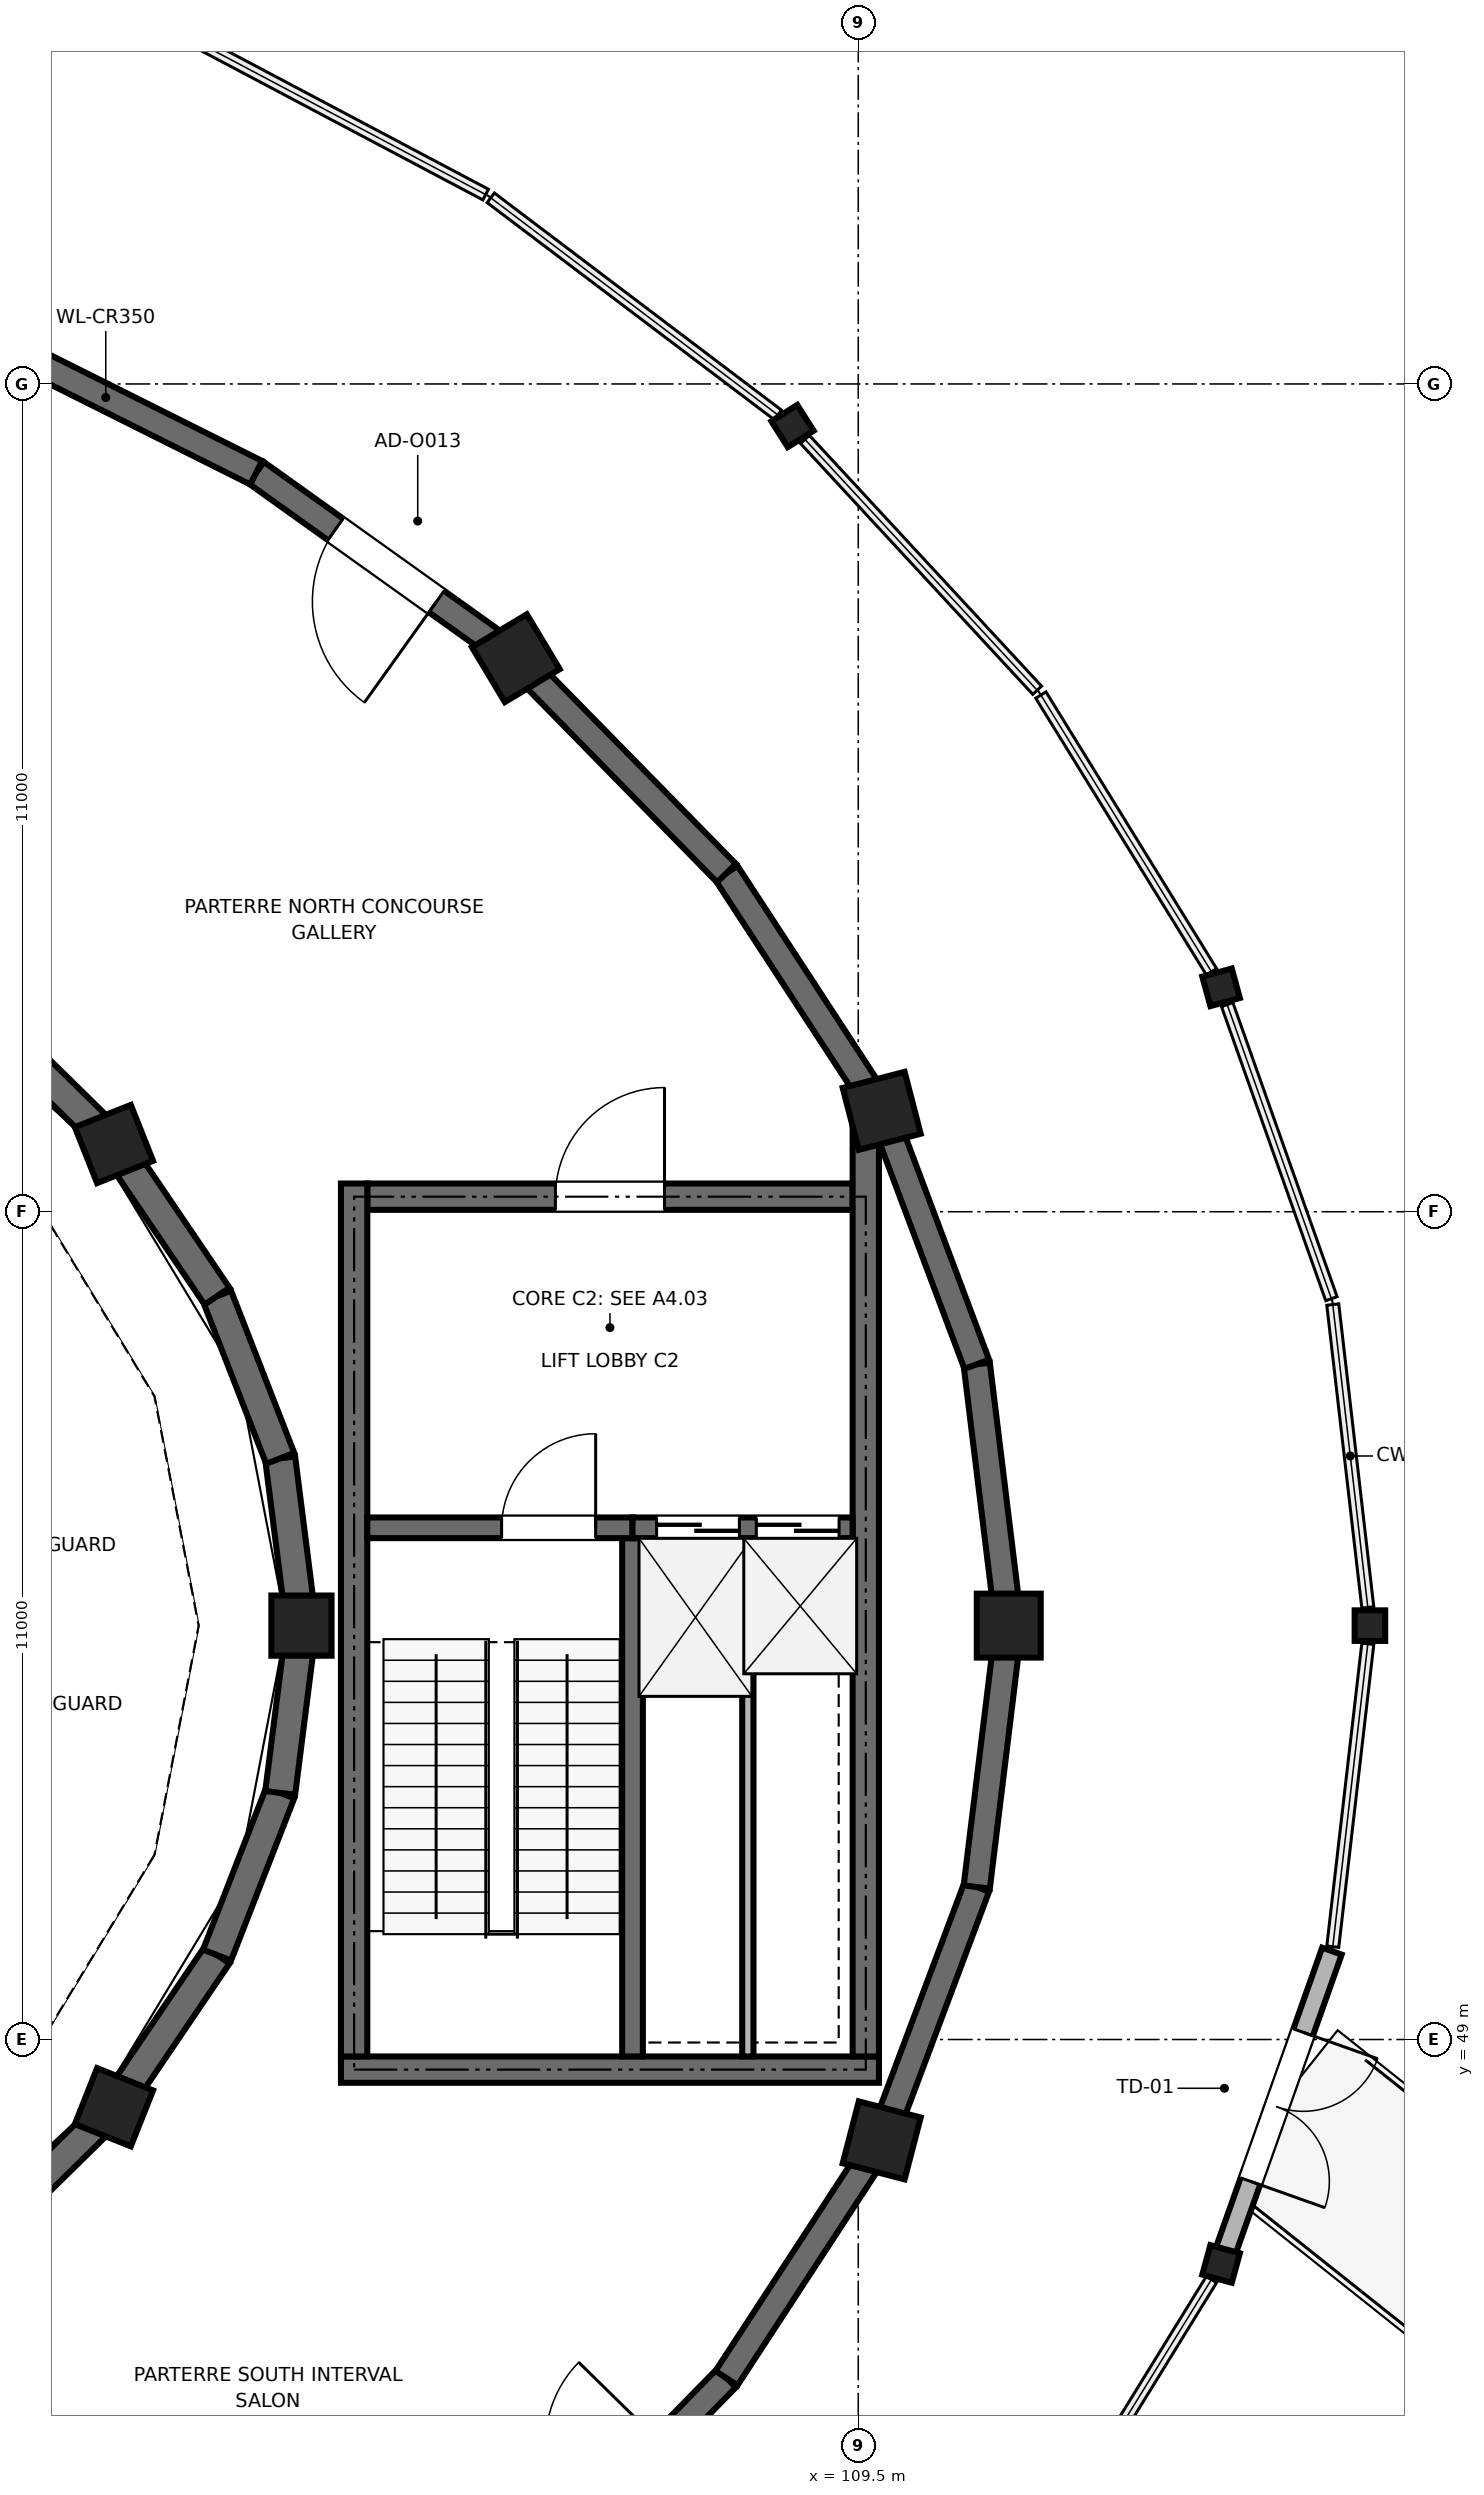
"""IFC4 building model, lengths in metres.
Left out: names, types, materials, properties, quantities, classifications, styles, units other than length and angle.
Written with IfcOpenShell. Run it as: python <this file> out.ifc"""

import sys

from ifc_helpers import new_model, si_unit, direction, frame, frame_2d, origin, origin_2d, place, context, subcontext, project, spatial, rectangle, circle, hollow_circle, extrude, element, fill, save


model = new_model("IFC4")
c1 = context("Model", 3, precision=1e-05, world=origin(), true_north=direction((0.0, 1.0)))
c2 = subcontext(c1, "Body", "Model", "MODEL_VIEW")
j1 = project(units=[si_unit("LENGTHUNIT", "METRE"), si_unit("PLANEANGLEUNIT", "RADIAN")], contexts=[c1])
p1 = place(None, origin())
s1 = spatial("IfcSite", under=j1, at=p1, CompositionType="ELEMENT")
p2 = place(p1, origin())
s2 = spatial("IfcBuilding", under=s1, at=p2, CompositionType="ELEMENT")
p3 = place(p2, frame((0.0, 0.0, 4.8)))
s3 = spatial("IfcBuildingStorey", under=s2, at=p3, CompositionType="ELEMENT", Elevation=4.8)
for number, where, z_axis, x_axis in (
    (1, (116.3, 54.5, 0.0), (0.0, 0.0, 1.0), (1.0, 0.0, 0.0)),
    (2, (114.322, 62.982, 0.0), (0.0, 0.0, 1.0), (0.964, 0.265, 0.0)),
    (3, (108.626, 70.441, 0.0), (0.0, 0.0, 1.0), (0.844, 0.536, 0.0)),
    (4, (114.322, 46.018, 0.0), (0.0, 0.0, 1.0), (0.964, -0.265, 0.0)),
):
    element("IfcColumn", number, at=place(p3, frame(where, z_axis=z_axis, x_axis=x_axis)), inside=s3, PredefinedType="COLUMN", context=c2, shape_type="SweptSolid", body=[
        extrude(hollow_circle(Radius=0.203, WallThickness=0.025, at=origin_2d()), origin(), (0.0, 0.0, 1.0), 4.8),
    ])
for number, where, z_axis, x_axis in (
    (5, (111.5, 54.5, 0.0), (0.0, 0.0, 1.0), (1.0, 0.0, 0.0)),
    (6, (109.811, 61.34, 0.0), (0.0, 0.0, 1.0), (0.968, 0.252, 0.0)),
    (7, (104.949, 67.356, 0.0), (0.0, 0.0, 1.0), (0.858, 0.514, 0.0)),
    (8, (109.811, 47.66, 0.0), (0.0, 0.0, 1.0), (0.968, -0.252, 0.0)),
):
    element("IfcColumn", number, at=place(p3, frame(where, z_axis=z_axis, x_axis=x_axis)), inside=s3, PredefinedType="COLUMN", context=c2, shape_type="SweptSolid", body=[
        extrude(rectangle(XDim=0.85, YDim=0.85, at=origin_2d()), origin(), (0.0, 0.0, 1.0), 4.8),
    ])
for number, where, z_axis, x_axis in (
    (9, (102.1, 54.5, 0.0), (0.0, 0.0, 1.0), (1.0, 0.0, 0.0)),
    (10, (99.608, 60.9, 0.0), (0.0, 0.0, 1.0), (0.929, 0.369, 0.0)),
    (11, (99.608, 48.1, 0.0), (0.0, 0.0, 1.0), (0.929, -0.369, 0.0)),
):
    element("IfcColumn", number, at=place(p3, frame(where, z_axis=z_axis, x_axis=x_axis)), inside=s3, PredefinedType="COLUMN", context=c2, shape_type="SweptSolid", body=[
        extrude(circle(Radius=0.4, at=origin_2d()), origin(), (0.0, 0.0, 1.0), 4.8),
    ])
p4 = place(p3, frame((111.5, 54.5, 0.0), z_axis=(0.0, 0.0, 1.0), x_axis=(-0.121552414401, 0.99258501427, 0.0)))
e12 = element("IfcWall", 12, at=p4, inside=s3, PredefinedType="SHEAR", context=c2, shape_type="SweptSolid", body=[
    extrude(rectangle(XDim=3.499, YDim=0.35, at=frame_2d((1.75, 0.0))), origin(), (0.0, 0.0, 1.0), 4.54),
])
p5 = place(p3, frame((111.075, 57.973, 0.0), z_axis=(0.0, 0.0, 1.0), x_axis=(-0.351279653979, 0.936270583058, 0.0)))
e13 = element("IfcWall", 13, at=p5, inside=s3, PredefinedType="SHEAR", context=c2, shape_type="SweptSolid", body=[
    extrude(rectangle(XDim=3.597, YDim=0.35, at=frame_2d((1.798, 0.0))), origin(), (0.0, 0.0, 1.0), 4.54),
])
p6 = place(p3, frame((109.811, 61.34, 0.0), z_axis=(0.0, 0.0, 1.0), x_axis=(-0.546611158382, 0.837386554425, 0.0)))
e14 = element("IfcWall", 14, at=p6, inside=s3, PredefinedType="SHEAR", context=c2, shape_type="SweptSolid", body=[
    extrude(rectangle(XDim=3.773, YDim=0.35, at=frame_2d((1.887, 0.0))), origin(), (0.0, 0.0, 1.0), 4.54),
])
p7 = place(p3, frame((107.749, 64.5, 0.0), z_axis=(0.0, 0.0, 1.0), x_axis=(-0.700051268358, 0.714092586203, 0.0)))
e15 = element("IfcWall", 15, at=p7, inside=s3, PredefinedType="SHEAR", context=c2, shape_type="SweptSolid", body=[
    extrude(rectangle(XDim=3.999, YDim=0.35, at=frame_2d((2.0, 0.0))), origin(), (0.0, 0.0, 1.0), 4.54),
])
p8 = place(p3, frame((104.949, 67.356, 0.0), z_axis=(0.0, 0.0, 1.0), x_axis=(-0.813737360708, 0.581232748378, 0.0)))
e16 = element("IfcWall", 16, at=p8, inside=s3, PredefinedType="SHEAR", context=c2, shape_type="SweptSolid", body=[
    extrude(rectangle(XDim=4.241, YDim=0.35, at=frame_2d((2.121, 0.0))), origin(), (0.0, 0.0, 1.0), 4.54),
])
p9 = place(p8, frame((1.295, 0.0, 0.0)))
e17 = element("IfcOpeningElement", 17, at=p9, cuts=e16, PredefinedType="OPENING", context=c2, shape_type="SweptSolid", body=[
    extrude(rectangle(XDim=1.65, YDim=2.2, at=frame_2d((0.825, 1.1))), frame((0.0, 0.185, 0.0), z_axis=(0.0, -1.0, 0.0), x_axis=(1.0, 0.0, 0.0)), (0.0, 0.0, 1.0), 0.37),
])
p10 = place(p3, frame((101.498, 69.821, 0.0), z_axis=(0.0, 0.0, 1.0), x_axis=(-0.894361644392, 0.447344664705, 0.0)))
e18 = element("IfcWall", 18, at=p10, inside=s3, PredefinedType="SHEAR", context=c2, shape_type="SweptSolid", body=[
    extrude(rectangle(XDim=4.47, YDim=0.35, at=frame_2d((2.235, 0.0))), origin(), (0.0, 0.0, 1.0), 4.54),
])
p11 = place(p3, frame((104.949, 41.644, 0.0), z_axis=(0.0, 0.0, 1.0), x_axis=(0.700051268358, 0.714092586203, 0.0)))
e19 = element("IfcWall", 19, at=p11, inside=s3, PredefinedType="SHEAR", context=c2, shape_type="SweptSolid", body=[
    extrude(rectangle(XDim=3.999, YDim=0.35, at=frame_2d((2.0, 0.0))), origin(), (0.0, 0.0, 1.0), 4.54),
])
p12 = place(p11, frame((1.225, 0.0, 0.0)))
e20 = element("IfcOpeningElement", 20, at=p12, cuts=e19, PredefinedType="OPENING", context=c2, shape_type="SweptSolid", body=[
    extrude(rectangle(XDim=1.55, YDim=2.18, at=frame_2d((0.775, 1.09))), frame((0.0, 0.185, 0.0), z_axis=(0.0, -1.0, 0.0), x_axis=(1.0, 0.0, 0.0)), (0.0, 0.0, 1.0), 0.37),
])
p13 = place(p3, frame((107.749, 44.5, 0.0), z_axis=(0.0, 0.0, 1.0), x_axis=(0.546611158382, 0.837386554425, 0.0)))
e21 = element("IfcWall", 21, at=p13, inside=s3, PredefinedType="SHEAR", context=c2, shape_type="SweptSolid", body=[
    extrude(rectangle(XDim=3.773, YDim=0.35, at=frame_2d((1.887, 0.0))), origin(), (0.0, 0.0, 1.0), 4.54),
])
p14 = place(p3, frame((109.811, 47.66, 0.0), z_axis=(0.0, 0.0, 1.0), x_axis=(0.351279653979, 0.936270583058, 0.0)))
e22 = element("IfcWall", 22, at=p14, inside=s3, PredefinedType="SHEAR", context=c2, shape_type="SweptSolid", body=[
    extrude(rectangle(XDim=3.597, YDim=0.35, at=frame_2d((1.798, 0.0))), origin(), (0.0, 0.0, 1.0), 4.54),
])
p15 = place(p3, frame((111.075, 51.027, 0.0), z_axis=(0.0, 0.0, 1.0), x_axis=(0.121552414401, 0.99258501427, 0.0)))
e23 = element("IfcWall", 23, at=p15, inside=s3, PredefinedType="SHEAR", context=c2, shape_type="SweptSolid", body=[
    extrude(rectangle(XDim=3.499, YDim=0.35, at=frame_2d((1.75, 0.0))), origin(), (0.0, 0.0, 1.0), 4.54),
])
p16 = place(p3, frame((102.1, 54.5, 0.0), z_axis=(0.0, 0.0, 1.0), x_axis=(-0.126180195213, 0.992007337844, 0.0)))
e24 = element("IfcWall", 24, at=p16, inside=s3, PredefinedType="SOLIDWALL", context=c2, shape_type="SweptSolid", body=[
    extrude(rectangle(XDim=2.24, YDim=0.4, at=frame_2d((1.12, 0.0))), origin(), (0.0, 0.0, 1.0), 4.54),
])
p17 = place(p3, frame((101.817, 56.723, 0.0), z_axis=(0.0, 0.0, 1.0), x_axis=(-0.362802811216, 0.931865934657, 0.0)))
e25 = element("IfcWall", 25, at=p17, inside=s3, PredefinedType="SOLIDWALL", context=c2, shape_type="SweptSolid", body=[
    extrude(rectangle(XDim=2.313, YDim=0.4, at=frame_2d((1.156, 0.0))), origin(), (0.0, 0.0, 1.0), 4.54),
])
p18 = place(p3, frame((100.978, 58.878, 0.0), z_axis=(0.0, 0.0, 1.0), x_axis=(-0.560958648975, 0.827843822312, 0.0)))
e26 = element("IfcWall", 26, at=p18, inside=s3, PredefinedType="SOLIDWALL", context=c2, shape_type="SweptSolid", body=[
    extrude(rectangle(XDim=2.442, YDim=0.4, at=frame_2d((1.221, 0.0))), origin(), (0.0, 0.0, 1.0), 4.54),
])
for number, where, z_axis, x_axis in (
    (27, (99.608, 60.9, 0.0), (0.0, 0.0, 1.0), (-0.713, 0.701, 0.0)),
    (28, (97.748, 46.272, 0.0), (0.0, 0.0, 1.0), (0.713, 0.701, 0.0)),
):
    element("IfcWall", number, at=place(p3, frame(where, z_axis=z_axis, x_axis=x_axis)), inside=s3, PredefinedType="SOLIDWALL", context=c2, shape_type="SweptSolid", body=[
        extrude(rectangle(XDim=2.608, YDim=0.4, at=frame_2d((1.304, 0.0))), origin(), (0.0, 0.0, 1.0), 4.54),
    ])
p19 = place(p3, frame((99.608, 48.1, 0.0), z_axis=(0.0, 0.0, 1.0), x_axis=(0.560958648975, 0.827843822312, 0.0)))
e29 = element("IfcWall", 29, at=p19, inside=s3, PredefinedType="SOLIDWALL", context=c2, shape_type="SweptSolid", body=[
    extrude(rectangle(XDim=2.442, YDim=0.4, at=frame_2d((1.221, 0.0))), origin(), (0.0, 0.0, 1.0), 4.54),
])
p20 = place(p3, frame((100.978, 50.122, 0.0), z_axis=(0.0, 0.0, 1.0), x_axis=(0.362802811216, 0.931865934657, 0.0)))
e30 = element("IfcWall", 30, at=p20, inside=s3, PredefinedType="SOLIDWALL", context=c2, shape_type="SweptSolid", body=[
    extrude(rectangle(XDim=2.313, YDim=0.4, at=frame_2d((1.156, 0.0))), origin(), (0.0, 0.0, 1.0), 4.54),
])
p21 = place(p3, frame((101.817, 52.277, 0.0), z_axis=(0.0, 0.0, 1.0), x_axis=(0.126180195213, 0.992007337844, 0.0)))
e31 = element("IfcWall", 31, at=p21, inside=s3, PredefinedType="SOLIDWALL", context=c2, shape_type="SweptSolid", body=[
    extrude(rectangle(XDim=2.24, YDim=0.4, at=frame_2d((1.12, 0.0))), origin(), (0.0, 0.0, 1.0), 4.54),
])
p22 = place(p3, frame((115.795, 50.175, 0.0), z_axis=(0.0, 0.0, 1.0), x_axis=(-0.334024212389, -0.9425644941, 0.0)))
e32 = element("IfcWall", 32, at=p22, inside=s3, PredefinedType="SOLIDWALL", context=c2, shape_type="SweptSolid", body=[
    extrude(rectangle(XDim=4.39, YDim=0.275, at=frame_2d((2.195, 0.0))), origin(), (0.0, 0.0, 1.0), 4.078),
])
p23 = place(p22, frame((1.145, 0.0, 0.0)))
e33 = element("IfcOpeningElement", 33, at=p23, cuts=e32, PredefinedType="OPENING", context=c2, shape_type="SweptSolid", body=[
    extrude(rectangle(XDim=2.1, YDim=2.3, at=frame_2d((1.05, 1.15))), frame((0.0, 0.147, 0.0), z_axis=(0.0, -1.0, 0.0), x_axis=(1.0, 0.0, 0.0)), (0.0, 0.0, 1.0), 0.295),
])
p24 = place(p3, frame((102.625, 48.6, 0.0), z_axis=(0.0, 0.0, 1.0), x_axis=(1.0, 0.0, 0.0)))
e34 = element("IfcWall", 34, at=p24, inside=s3, PredefinedType="SHEAR", context=c2, shape_type="SweptSolid", body=[
    extrude(rectangle(XDim=7.15, YDim=0.35, at=frame_2d((3.575, 0.0))), origin(), (0.0, 0.0, 1.0), 4.54),
])
p25 = place(p3, frame((102.975, 60.2, 0.0), z_axis=(0.0, 0.0, 1.0), x_axis=(1.0, 0.0, 0.0)))
e35 = element("IfcWall", 35, at=p25, inside=s3, PredefinedType="SHEAR", context=c2, shape_type="SweptSolid", body=[
    extrude(rectangle(XDim=6.45, YDim=0.35, at=frame_2d((3.225, 0.0))), origin(), (0.0, 0.0, 1.0), 4.54),
])
p26 = place(p25, frame((2.5, 0.0, 0.0)))
e36 = element("IfcOpeningElement", 36, at=p26, cuts=e35, PredefinedType="OPENING", context=c2, shape_type="SweptSolid", body=[
    extrude(rectangle(XDim=1.45, YDim=2.2, at=frame_2d((0.725, 1.1))), frame((0.0, 0.185, 0.0), z_axis=(0.0, -1.0, 0.0), x_axis=(1.0, 0.0, 0.0)), (0.0, 0.0, 1.0), 0.37),
])
p27 = place(p3, frame((102.8, 48.775, 0.0), z_axis=(0.0, 0.0, 1.0), x_axis=(0.0, 1.0, 0.0)))
e37 = element("IfcWall", 37, at=p27, inside=s3, PredefinedType="SHEAR", context=c2, shape_type="SweptSolid", body=[
    extrude(rectangle(XDim=11.6, YDim=0.35, at=frame_2d((5.8, 0.0))), origin(), (0.0, 0.0, 1.0), 4.54),
])
p28 = place(p3, frame((109.6, 48.775, 0.0), z_axis=(0.0, 0.0, 1.0), x_axis=(0.0, 1.0, 0.0)))
e38 = element("IfcWall", 38, at=p28, inside=s3, PredefinedType="SHEAR", context=c2, shape_type="SweptSolid", body=[
    extrude(rectangle(XDim=12.565, YDim=0.35, at=frame_2d((6.283, 0.0))), origin(), (0.0, 0.0, 1.0), 4.54),
])
p29 = place(p3, frame((106.5, 48.775, 0.0), z_axis=(0.0, 0.0, 1.0), x_axis=(0.0, 1.0, 0.0)))
e39 = element("IfcWall", 39, at=p29, inside=s3, PredefinedType="SHEAR", context=c2, shape_type="SweptSolid", body=[
    extrude(rectangle(XDim=6.888, YDim=0.275, at=frame_2d((3.444, 0.0))), origin(), (0.0, 0.0, 1.0), 4.54),
])
p30 = place(p3, frame((102.975, 55.8, 0.0), z_axis=(0.0, 0.0, 1.0), x_axis=(1.0, 0.0, 0.0)))
e40 = element("IfcWall", 40, at=p30, inside=s3, PredefinedType="SHEAR", context=c2, shape_type="SweptSolid", body=[
    extrude(rectangle(XDim=3.525, YDim=0.275, at=frame_2d((1.762, 0.0))), origin(), (0.0, 0.0, 1.0), 4.54),
])
p31 = place(p30, frame((1.785, 0.0, 0.0)))
e41 = element("IfcOpeningElement", 41, at=p31, cuts=e40, PredefinedType="OPENING", context=c2, shape_type="SweptSolid", body=[
    extrude(rectangle(XDim=1.25, YDim=2.15, at=frame_2d((0.625, 1.075))), frame((0.0, 0.147, 0.0), z_axis=(0.0, -1.0, 0.0), x_axis=(1.0, 0.0, 0.0)), (0.0, 0.0, 1.0), 0.295),
])
p32 = place(p3, frame((106.5, 55.8, 0.0), z_axis=(0.0, 0.0, 1.0), x_axis=(1.0, 0.0, 0.0)))
e42 = element("IfcWall", 42, at=p32, inside=s3, PredefinedType="SHEAR", context=c2, shape_type="SweptSolid", body=[
    extrude(rectangle(XDim=2.925, YDim=0.275, at=frame_2d((1.462, 0.0))), origin(), (0.0, 0.0, 1.0), 4.54),
])
p33 = place(p32, frame((0.32, 0.0, 0.0)))
e43 = element("IfcOpeningElement", 43, at=p33, cuts=e42, PredefinedType="OPENING", context=c2, shape_type="SweptSolid", body=[
    extrude(rectangle(XDim=1.1, YDim=2.15, at=frame_2d((0.55, 1.075))), frame((0.0, 0.147, 0.0), z_axis=(0.0, -1.0, 0.0), x_axis=(1.0, 0.0, 0.0)), (0.0, 0.0, 1.0), 0.295),
])
p34 = place(p32, frame((1.645, 0.0, 0.0)))
e44 = element("IfcOpeningElement", 44, at=p34, cuts=e42, PredefinedType="OPENING", context=c2, shape_type="SweptSolid", body=[
    extrude(rectangle(XDim=1.1, YDim=2.15, at=frame_2d((0.55, 1.075))), frame((0.0, 0.147, 0.0), z_axis=(0.0, -1.0, 0.0), x_axis=(1.0, 0.0, 0.0)), (0.0, 0.0, 1.0), 0.295),
])
p35 = place(p3, frame((108.032, 48.775, 0.0), z_axis=(0.0, 0.0, 1.0), x_axis=(0.0, 1.0, 0.0)))
e45 = element("IfcWall", 45, at=p35, inside=s3, PredefinedType="PARTITIONING", context=c2, shape_type="SweptSolid", body=[
    extrude(rectangle(XDim=6.825, YDim=0.15, at=frame_2d((3.413, 0.0))), origin(), (0.0, 0.0, 1.0), 4.534),
])
p36 = place(p23, origin())
e46 = element("IfcDoor", 46, at=p36, inside=s3, OperationType="DOUBLE_DOOR_SINGLE_SWING", PredefinedType="DOOR", context=c2, shape_type="SweptSolid", body=[
    extrude(rectangle(XDim=2.1, YDim=2.3, at=frame_2d((1.05, 1.15))), frame((0.0, 0.025, 0.0), z_axis=(0.0, -1.0, 0.0), x_axis=(1.0, 0.0, 0.0)), (0.0, 0.0, 1.0), 0.05),
])
fill(e33, e46)
p37 = place(p31, origin())
e47 = element("IfcDoor", 47, at=p37, inside=s3, OperationType="SINGLE_SWING_RIGHT", PredefinedType="DOOR", context=c2, shape_type="SweptSolid", body=[
    extrude(rectangle(XDim=1.25, YDim=2.15, at=frame_2d((0.625, 1.075))), frame((0.0, 0.025, 0.0), z_axis=(0.0, -1.0, 0.0), x_axis=(1.0, 0.0, 0.0)), (0.0, 0.0, 1.0), 0.05),
])
fill(e41, e47)
p38 = place(p33, origin())
e48 = element("IfcDoor", 48, at=p38, inside=s3, OperationType="DOUBLE_DOOR_SLIDING", PredefinedType="DOOR", context=c2, shape_type="SweptSolid", body=[
    extrude(rectangle(XDim=1.1, YDim=2.15, at=frame_2d((0.55, 1.075))), frame((0.0, 0.025, 0.0), z_axis=(0.0, -1.0, 0.0), x_axis=(1.0, 0.0, 0.0)), (0.0, 0.0, 1.0), 0.05),
])
fill(e43, e48)
p39 = place(p34, origin())
e49 = element("IfcDoor", 49, at=p39, inside=s3, OperationType="DOUBLE_DOOR_SLIDING", PredefinedType="DOOR", context=c2, shape_type="SweptSolid", body=[
    extrude(rectangle(XDim=1.1, YDim=2.15, at=frame_2d((0.55, 1.075))), frame((0.0, 0.025, 0.0), z_axis=(0.0, -1.0, 0.0), x_axis=(1.0, 0.0, 0.0)), (0.0, 0.0, 1.0), 0.05),
])
fill(e44, e49)
p40 = place(p26, origin())
e50 = element("IfcDoor", 50, at=p40, inside=s3, OperationType="SINGLE_SWING_RIGHT", PredefinedType="DOOR", context=c2, shape_type="SweptSolid", body=[
    extrude(rectangle(XDim=1.45, YDim=2.2, at=frame_2d((0.725, 1.1))), frame((0.0, 0.025, 0.0), z_axis=(0.0, -1.0, 0.0), x_axis=(1.0, 0.0, 0.0)), (0.0, 0.0, 1.0), 0.05),
])
fill(e36, e50)
p41 = place(p9, origin())
e51 = element("IfcDoor", 51, at=p41, inside=s3, OperationType="SINGLE_SWING_LEFT", PredefinedType="DOOR", context=c2, shape_type="SweptSolid", body=[
    extrude(rectangle(XDim=1.65, YDim=2.2, at=frame_2d((0.825, 1.1))), frame((0.0, 0.025, 0.0), z_axis=(0.0, -1.0, 0.0), x_axis=(1.0, 0.0, 0.0)), (0.0, 0.0, 1.0), 0.05),
])
fill(e17, e51)
save(model, sys.argv[1])
